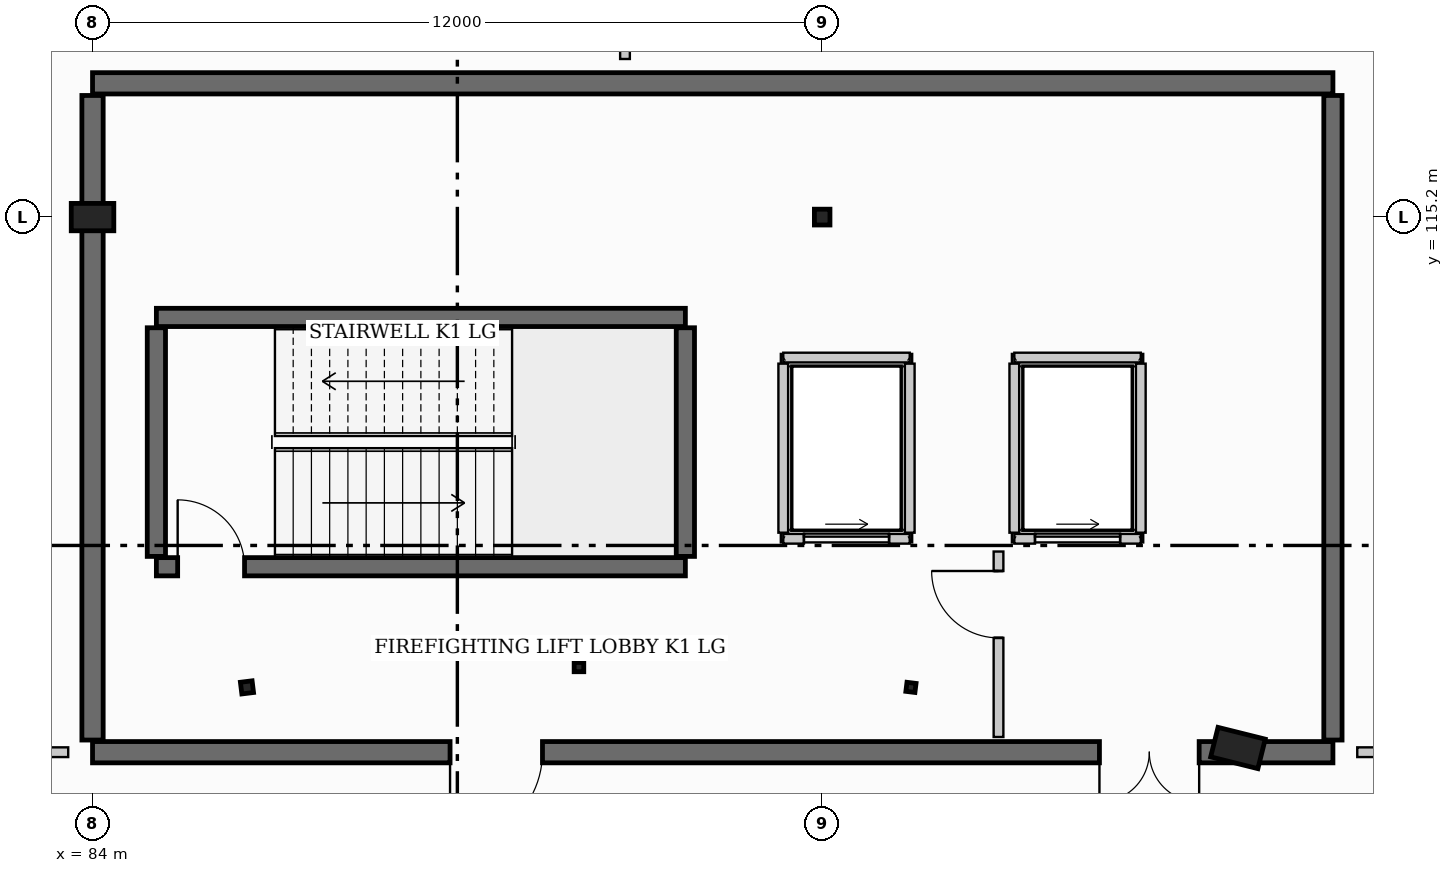
"""IFC4 building model, lengths in metres.
Left out: names, types, materials, properties, quantities, classifications, styles, units other than length and angle.
Written with IfcOpenShell. Run it as: python <this file> out.ifc"""

import sys

from ifc_helpers import new_model, si_unit, direction, frame, frame_2d, origin, origin_2d, place, context, subcontext, project, spatial, rectangle, hollow_rectangle, hollow_circle, i_section, extrude, element, fill, save


model = new_model("IFC4")
c1 = context("Model", 3, precision=1e-05, world=origin(), true_north=direction((0.0, 1.0)))
c2 = subcontext(c1, "Body", "Model", "MODEL_VIEW")
j1 = project(units=[si_unit("LENGTHUNIT", "METRE"), si_unit("PLANEANGLEUNIT", "RADIAN")], contexts=[c1])
p1 = place(None, origin())
s1 = spatial("IfcSite", under=j1, at=p1, CompositionType="ELEMENT")
p2 = place(p1, origin())
s2 = spatial("IfcBuilding", under=s1, at=p2, CompositionType="ELEMENT")
p3 = place(p2, frame((0.0, 0.0, -4.8)))
s3 = spatial("IfcBuildingStorey", under=s2, at=p3, CompositionType="ELEMENT", Elevation=-4.8)
p4 = place(p3, frame((84.0, 115.2, 0.0), z_axis=(0.0, 0.0, 1.0), x_axis=(0.0, 1.0, 0.0)))
e1 = element("IfcColumn", 1, at=p4, inside=s3, PredefinedType="PILASTER", context=c2, shape_type="SweptSolid", body=[
    extrude(rectangle(XDim=0.45, YDim=0.7, at=origin_2d()), origin(), (0.0, 0.0, 1.0), 4.8),
])
p5 = place(p3, frame((96.0, 115.2, 0.0), z_axis=(0.0, 0.0, 1.0), x_axis=(1.0, 0.0, 0.0)))
e2 = element("IfcColumn", 2, at=p5, inside=s3, PredefinedType="COLUMN", context=c2, shape_type="SweptSolid", body=[
    extrude(i_section(OverallWidth=0.256, OverallDepth=0.26, WebThickness=0.01, FlangeThickness=0.017, at=origin_2d()), origin(), (0.0, 0.0, 1.0), 4.8),
])
p6 = place(p3, frame((86.54, 107.466, 0.0), z_axis=(0.0, 0.0, 1.0), x_axis=(-0.121869343405, 0.992546151641, 0.0)))
e3 = element("IfcColumn", 3, at=p6, inside=s3, PredefinedType="COLUMN", context=c2, shape_type="SweptSolid", body=[
    extrude(hollow_circle(Radius=0.097, WallThickness=0.008, at=origin_2d()), origin(), (0.0, 0.0, 1.0), 4.8),
])
p7 = place(p3, frame((92.0, 107.8, 0.0), z_axis=(0.0, 0.0, 1.0), x_axis=(0.0, 1.0, 0.0)))
e4 = element("IfcColumn", 4, at=p7, inside=s3, PredefinedType="COLUMN", context=c2, shape_type="SweptSolid", body=[
    extrude(i_section(OverallWidth=0.153, OverallDepth=0.158, WebThickness=0.007, FlangeThickness=0.01, at=origin_2d()), origin(), (0.0, 0.0, 1.0), 4.8),
])
p8 = place(p3, frame((97.46, 107.466, 0.0), z_axis=(0.0, 0.0, 1.0), x_axis=(0.121869343405, 0.992546151641, 0.0)))
e5 = element("IfcColumn", 5, at=p8, inside=s3, PredefinedType="COLUMN", context=c2, shape_type="SweptSolid", body=[
    extrude(hollow_rectangle(XDim=0.15, YDim=0.15, WallThickness=0.008, at=origin_2d()), origin(), (0.0, 0.0, 1.0), 4.8),
])
p9 = place(p3, frame((102.838, 106.469, 0.0), z_axis=(0.0, 0.0, 1.0), x_axis=(0.2419218956, 0.970295726276, 0.0)))
e6 = element("IfcColumn", 6, at=p9, inside=s3, PredefinedType="PILASTER", context=c2, shape_type="SweptSolid", body=[
    extrude(rectangle(XDim=0.5, YDim=0.8, at=origin_2d()), origin(), (0.0, 0.0, 1.0), 4.8),
])
p10 = place(p3, frame((84.0, 117.4, 0.0), z_axis=(0.0, 0.0, 1.0), x_axis=(1.0, 0.0, 0.0)))
e7 = element("IfcWall", 7, at=p10, inside=s3, PredefinedType="SHEAR", context=c2, shape_type="SweptSolid", body=[
    extrude(rectangle(XDim=20.4, YDim=0.35, at=frame_2d((10.2, 0.0))), origin(), (0.0, 0.0, 1.0), 4.8),
])
p11 = place(p3, frame((104.4, 106.4, 0.0), z_axis=(0.0, 0.0, 1.0), x_axis=(-1.0, 0.0, 0.0)))
e8 = element("IfcWall", 8, at=p11, inside=s3, PredefinedType="SHEAR", context=c2, shape_type="SweptSolid", body=[
    extrude(rectangle(XDim=20.4, YDim=0.35, at=frame_2d((10.2, 0.0))), origin(), (0.0, 0.0, 1.0), 4.8),
])
p12 = place(p11, frame((2.2, 0.0, 0.0)))
e9 = element("IfcOpeningElement", 9, at=p12, cuts=e8, PredefinedType="OPENING", context=c2, shape_type="SweptSolid", body=[
    extrude(rectangle(XDim=1.64, YDim=2.2, at=frame_2d((0.82, 1.1))), frame((0.0, 0.185, 0.0), z_axis=(0.0, -1.0, 0.0), x_axis=(1.0, 0.0, 0.0)), (0.0, 0.0, 1.0), 0.37),
])
p13 = place(p11, frame((13.0, 0.0, 0.0)))
e10 = element("IfcOpeningElement", 10, at=p13, cuts=e8, PredefinedType="OPENING", context=c2, shape_type="SweptSolid", body=[
    extrude(rectangle(XDim=1.52, YDim=2.16, at=frame_2d((0.76, 1.08))), frame((0.0, 0.185, 0.0), z_axis=(0.0, -1.0, 0.0), x_axis=(1.0, 0.0, 0.0)), (0.0, 0.0, 1.0), 0.37),
])
p14 = place(p3, frame((84.0, 106.6, 0.0), z_axis=(0.0, 0.0, 1.0), x_axis=(0.0, 1.0, 0.0)))
e11 = element("IfcWall", 11, at=p14, inside=s3, PredefinedType="SHEAR", context=c2, shape_type="SweptSolid", body=[
    extrude(rectangle(XDim=10.6, YDim=0.35, at=frame_2d((5.3, 0.0))), origin(), (0.0, 0.0, 1.0), 4.8),
])
p15 = place(p3, frame((104.4, 117.2, 0.0), z_axis=(0.0, 0.0, 1.0), x_axis=(0.0, -1.0, 0.0)))
e12 = element("IfcWall", 12, at=p15, inside=s3, PredefinedType="SHEAR", context=c2, shape_type="SweptSolid", body=[
    extrude(rectangle(XDim=10.6, YDim=0.3, at=frame_2d((5.3, 0.0))), origin(), (0.0, 0.0, 1.0), 4.8),
])
p16 = place(p3, frame((85.05, 109.45, 0.0), z_axis=(0.0, 0.0, 1.0), x_axis=(1.0, 0.0, 0.0)))
e13 = element("IfcWall", 13, at=p16, inside=s3, PredefinedType="SHEAR", context=c2, shape_type="SweptSolid", body=[
    extrude(rectangle(XDim=8.7, YDim=0.3, at=frame_2d((4.35, 0.0))), origin(), (0.0, 0.0, 1.0), 4.8),
])
p17 = place(p16, frame((0.35, 0.0, 0.0)))
e14 = element("IfcOpeningElement", 14, at=p17, cuts=e13, PredefinedType="OPENING", context=c2, shape_type="SweptSolid", body=[
    extrude(rectangle(XDim=1.1, YDim=2.15, at=frame_2d((0.55, 1.075))), frame((0.0, 0.16, 0.0), z_axis=(0.0, -1.0, 0.0), x_axis=(1.0, 0.0, 0.0)), (0.0, 0.0, 1.0), 0.32),
])
p18 = place(p3, frame((93.75, 113.55, 0.0), z_axis=(0.0, 0.0, 1.0), x_axis=(-1.0, 0.0, 0.0)))
e15 = element("IfcWall", 15, at=p18, inside=s3, PredefinedType="SHEAR", context=c2, shape_type="SweptSolid", body=[
    extrude(rectangle(XDim=8.7, YDim=0.3, at=frame_2d((4.35, 0.0))), origin(), (0.0, 0.0, 1.0), 4.8),
])
for number, where, z_axis, x_axis in (
    (16, (85.05, 109.62, 0.0), (0.0, 0.0, 1.0), (0.0, 1.0, 0.0)),
    (17, (93.75, 109.62, 0.0), (0.0, 0.0, 1.0), (0.0, 1.0, 0.0)),
):
    element("IfcWall", number, at=place(p3, frame(where, z_axis=z_axis, x_axis=x_axis)), inside=s3, PredefinedType="SHEAR", context=c2, shape_type="SweptSolid", body=[
        extrude(rectangle(XDim=3.76, YDim=0.3, at=frame_2d((1.88, 0.0))), origin(), (0.0, 0.0, 1.0), 4.8),
    ])
p19 = place(p3, frame((95.36, 109.91, 0.0), z_axis=(0.0, 0.0, 1.0), x_axis=(1.0, 0.0, 0.0)))
e18 = element("IfcWall", 18, at=p19, inside=s3, PredefinedType="PARTITIONING", context=c2, shape_type="SweptSolid", body=[
    extrude(rectangle(XDim=2.08, YDim=0.16, at=frame_2d((1.04, 0.0))), origin(), (0.0, 0.0, 1.0), 4.43),
])
p20 = place(p19, frame((0.34, 0.0, 0.0)))
e19 = element("IfcOpeningElement", 19, at=p20, cuts=e18, PredefinedType="OPENING", context=c2, shape_type="SweptSolid", body=[
    extrude(rectangle(XDim=1.4, YDim=2.2, at=frame_2d((0.7, 1.1))), frame((0.0, 0.09, 0.0), z_axis=(0.0, -1.0, 0.0), x_axis=(1.0, 0.0, 0.0)), (0.0, 0.0, 1.0), 0.18),
])
p21 = place(p3, frame((97.44, 112.89, 0.0), z_axis=(0.0, 0.0, 1.0), x_axis=(-1.0, 0.0, 0.0)))
e20 = element("IfcWall", 20, at=p21, inside=s3, PredefinedType="PARTITIONING", context=c2, shape_type="SweptSolid", body=[
    extrude(rectangle(XDim=2.08, YDim=0.16, at=frame_2d((1.04, 0.0))), origin(), (0.0, 0.0, 1.0), 4.43),
])
for number, where, z_axis, x_axis in (
    (21, (95.36, 112.79, 0.0), (0.0, 0.0, 1.0), (0.0, -1.0, 0.0)),
    (22, (97.44, 110.01, 0.0), (0.0, 0.0, 1.0), (0.0, 1.0, 0.0)),
):
    element("IfcWall", number, at=place(p3, frame(where, z_axis=z_axis, x_axis=x_axis)), inside=s3, PredefinedType="PARTITIONING", context=c2, shape_type="SweptSolid", body=[
        extrude(rectangle(XDim=2.78, YDim=0.16, at=frame_2d((1.39, 0.0))), origin(), (0.0, 0.0, 1.0), 4.43),
    ])
p22 = place(p3, frame((99.16, 109.91, 0.0), z_axis=(0.0, 0.0, 1.0), x_axis=(1.0, 0.0, 0.0)))
e23 = element("IfcWall", 23, at=p22, inside=s3, PredefinedType="PARTITIONING", context=c2, shape_type="SweptSolid", body=[
    extrude(rectangle(XDim=2.08, YDim=0.16, at=frame_2d((1.04, 0.0))), origin(), (0.0, 0.0, 1.0), 4.43),
])
p23 = place(p22, frame((0.34, 0.0, 0.0)))
e24 = element("IfcOpeningElement", 24, at=p23, cuts=e23, PredefinedType="OPENING", context=c2, shape_type="SweptSolid", body=[
    extrude(rectangle(XDim=1.4, YDim=2.2, at=frame_2d((0.7, 1.1))), frame((0.0, 0.09, 0.0), z_axis=(0.0, -1.0, 0.0), x_axis=(1.0, 0.0, 0.0)), (0.0, 0.0, 1.0), 0.18),
])
p24 = place(p3, frame((101.24, 112.89, 0.0), z_axis=(0.0, 0.0, 1.0), x_axis=(-1.0, 0.0, 0.0)))
e25 = element("IfcWall", 25, at=p24, inside=s3, PredefinedType="PARTITIONING", context=c2, shape_type="SweptSolid", body=[
    extrude(rectangle(XDim=2.08, YDim=0.16, at=frame_2d((1.04, 0.0))), origin(), (0.0, 0.0, 1.0), 4.43),
])
for number, where, z_axis, x_axis in (
    (26, (99.16, 112.79, 0.0), (0.0, 0.0, 1.0), (0.0, -1.0, 0.0)),
    (27, (101.24, 110.01, 0.0), (0.0, 0.0, 1.0), (0.0, 1.0, 0.0)),
):
    element("IfcWall", number, at=place(p3, frame(where, z_axis=z_axis, x_axis=x_axis)), inside=s3, PredefinedType="PARTITIONING", context=c2, shape_type="SweptSolid", body=[
        extrude(rectangle(XDim=2.78, YDim=0.16, at=frame_2d((1.39, 0.0))), origin(), (0.0, 0.0, 1.0), 4.43),
    ])
p25 = place(p3, frame((98.9, 106.65, 0.0), z_axis=(0.0, 0.0, 1.0), x_axis=(0.0, 1.0, 0.0)))
e28 = element("IfcWall", 28, at=p25, inside=s3, PredefinedType="PARTITIONING", context=c2, shape_type="SweptSolid", body=[
    extrude(rectangle(XDim=3.05, YDim=0.16, at=frame_2d((1.525, 0.0))), origin(), (0.0, 0.0, 1.0), 4.43),
])
p26 = place(p25, frame((1.63, 0.0, 0.0)))
e29 = element("IfcOpeningElement", 29, at=p26, cuts=e28, PredefinedType="OPENING", context=c2, shape_type="SweptSolid", body=[
    extrude(rectangle(XDim=1.1, YDim=2.15, at=frame_2d((0.55, 1.075))), frame((0.0, 0.09, 0.0), z_axis=(0.0, -1.0, 0.0), x_axis=(1.0, 0.0, 0.0)), (0.0, 0.0, 1.0), 0.18),
])
p27 = place(p3, frame((71.25, 106.4, 0.0), z_axis=(0.0, 0.0, 1.0), x_axis=(1.0, 0.0, 0.0)))
e30 = element("IfcWall", 30, at=p27, inside=s3, PredefinedType="PARTITIONING", context=c2, shape_type="SweptSolid", body=[
    extrude(rectangle(XDim=12.35, YDim=0.16, at=frame_2d((6.175, 0.0))), origin(), (0.0, 0.0, 1.0), 4.43),
])
p28 = place(p27, frame((5.525, 0.0, 0.0)))
e31 = element("IfcOpeningElement", 31, at=p28, cuts=e30, PredefinedType="OPENING", context=c2, shape_type="SweptSolid", body=[
    extrude(rectangle(XDim=1.64, YDim=2.2, at=frame_2d((0.82, 1.1))), frame((0.0, 0.09, 0.0), z_axis=(0.0, -1.0, 0.0), x_axis=(1.0, 0.0, 0.0)), (0.0, 0.0, 1.0), 0.18),
])
p29 = place(p3, frame((92.757, 117.8, 0.0), z_axis=(0.0, 0.0, 1.0), x_axis=(0.0, 1.0, 0.0)))
e32 = element("IfcWall", 32, at=p29, inside=s3, PredefinedType="PARTITIONING", context=c2, shape_type="SweptSolid", body=[
    extrude(rectangle(XDim=7.5, YDim=0.16, at=frame_2d((3.75, 0.0))), origin(), (0.0, 0.0, 1.0), 4.111),
])
p30 = place(p3, frame((104.8, 106.4, 0.0), z_axis=(0.0, 0.0, 1.0), x_axis=(1.0, 0.0, 0.0)))
e33 = element("IfcWall", 33, at=p30, inside=s3, PredefinedType="PARTITIONING", context=c2, shape_type="SweptSolid", body=[
    extrude(rectangle(XDim=6.35, YDim=0.16, at=frame_2d((3.175, 0.0))), origin(), (0.0, 0.0, 1.0), 4.43),
])
p31 = place(p30, frame((0.32, 0.0, 0.0)))
e34 = element("IfcOpeningElement", 34, at=p31, cuts=e33, PredefinedType="OPENING", context=c2, shape_type="SweptSolid", body=[
    extrude(rectangle(XDim=1.52, YDim=2.16, at=frame_2d((0.76, 1.08))), frame((0.0, 0.09, 0.0), z_axis=(0.0, -1.0, 0.0), x_axis=(1.0, 0.0, 0.0)), (0.0, 0.0, 1.0), 0.18),
])
p32 = place(p20, origin())
e35 = element("IfcDoor", 35, at=p32, inside=s3, OperationType="SLIDING_TO_LEFT", PredefinedType="DOOR", context=c2, shape_type="SweptSolid", body=[
    extrude(rectangle(XDim=1.4, YDim=2.2, at=frame_2d((0.7, 1.1))), frame((0.0, 0.025, 0.0), z_axis=(0.0, -1.0, 0.0), x_axis=(1.0, 0.0, 0.0)), (0.0, 0.0, 1.0), 0.05),
])
fill(e19, e35)
p33 = place(p23, origin())
e36 = element("IfcDoor", 36, at=p33, inside=s3, OperationType="SLIDING_TO_LEFT", PredefinedType="DOOR", context=c2, shape_type="SweptSolid", body=[
    extrude(rectangle(XDim=1.4, YDim=2.2, at=frame_2d((0.7, 1.1))), frame((0.0, 0.025, 0.0), z_axis=(0.0, -1.0, 0.0), x_axis=(1.0, 0.0, 0.0)), (0.0, 0.0, 1.0), 0.05),
])
fill(e24, e36)
p34 = place(p17, origin())
e37 = element("IfcDoor", 37, at=p34, inside=s3, OperationType="SINGLE_SWING_LEFT", PredefinedType="DOOR", context=c2, shape_type="SweptSolid", body=[
    extrude(rectangle(XDim=1.1, YDim=2.15, at=frame_2d((0.55, 1.075))), frame((0.0, 0.025, 0.0), z_axis=(0.0, -1.0, 0.0), x_axis=(1.0, 0.0, 0.0)), (0.0, 0.0, 1.0), 0.05),
])
fill(e14, e37)
p35 = place(p12, origin())
e38 = element("IfcDoor", 38, at=p35, inside=s3, OperationType="DOUBLE_DOOR_SINGLE_SWING", PredefinedType="DOOR", context=c2, shape_type="SweptSolid", body=[
    extrude(rectangle(XDim=1.64, YDim=2.2, at=frame_2d((0.82, 1.1))), frame((0.0, 0.025, 0.0), z_axis=(0.0, -1.0, 0.0), x_axis=(1.0, 0.0, 0.0)), (0.0, 0.0, 1.0), 0.05),
])
fill(e9, e38)
p36 = place(p13, origin())
e39 = element("IfcDoor", 39, at=p36, inside=s3, OperationType="SINGLE_SWING_RIGHT", PredefinedType="DOOR", context=c2, shape_type="SweptSolid", body=[
    extrude(rectangle(XDim=1.52, YDim=2.16, at=frame_2d((0.76, 1.08))), frame((0.0, 0.025, 0.0), z_axis=(0.0, -1.0, 0.0), x_axis=(1.0, 0.0, 0.0)), (0.0, 0.0, 1.0), 0.05),
])
fill(e10, e39)
p37 = place(p26, origin())
e40 = element("IfcDoor", 40, at=p37, inside=s3, OperationType="SINGLE_SWING_RIGHT", PredefinedType="DOOR", context=c2, shape_type="SweptSolid", body=[
    extrude(rectangle(XDim=1.1, YDim=2.15, at=frame_2d((0.55, 1.075))), frame((0.0, 0.025, 0.0), z_axis=(0.0, -1.0, 0.0), x_axis=(1.0, 0.0, 0.0)), (0.0, 0.0, 1.0), 0.05),
])
fill(e29, e40)
save(model, sys.argv[1])
